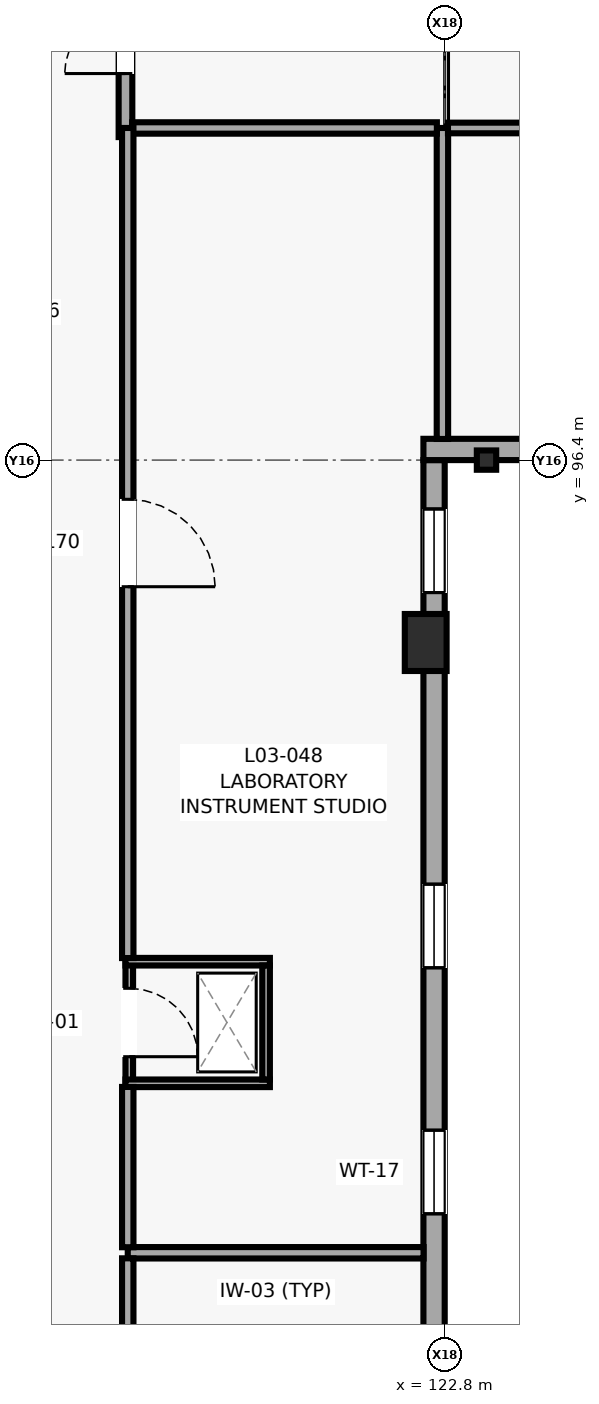
"""IFC4 building model, lengths in metres.
Left out: names, types, materials, properties, quantities, classifications, styles, units other than length and angle.
Written with IfcOpenShell. Run it as: python <this file> out.ifc"""

import sys

from ifc_helpers import new_model, si_unit, direction, frame, frame_2d, origin, origin_2d, place, context, subcontext, project, spatial, rectangle, i_section, extrude, element, fill, save


model = new_model("IFC4")
c1 = context("Model", 3, precision=1e-05, world=origin(), true_north=direction((0.0, 1.0)))
c2 = subcontext(c1, "Body", "Model", "MODEL_VIEW")
j1 = project(units=[si_unit("LENGTHUNIT", "METRE"), si_unit("PLANEANGLEUNIT", "RADIAN")], contexts=[c1])
p1 = place(None, origin())
s1 = spatial("IfcSite", under=j1, at=p1, CompositionType="ELEMENT")
p2 = place(p1, origin())
s2 = spatial("IfcBuilding", under=s1, at=p2, CompositionType="ELEMENT")
p3 = place(p2, frame((0.0, 0.0, 12.2)))
s3 = spatial("IfcBuildingStorey", under=s2, at=p3, CompositionType="ELEMENT", Elevation=12.2)
p4 = place(p3, frame((122.55, 94.0, 0.0), z_axis=(0.0, 0.0, 1.0), x_axis=(1.0, 0.0, 0.0)))
e1 = element("IfcColumn", 1, at=p4, inside=s3, PredefinedType="COLUMN", context=c2, shape_type="SweptSolid", body=[
    extrude(rectangle(XDim=0.55, YDim=0.75, at=origin_2d()), origin(), (0.0, 0.0, 1.0), 4.0),
])
p5 = place(p3, frame((123.35, 96.4, 0.0), z_axis=(0.0, 0.0, 1.0), x_axis=(1.0, 0.0, 0.0)))
e2 = element("IfcColumn", 2, at=p5, inside=s3, PredefinedType="COLUMN", context=c2, shape_type="SweptSolid", body=[
    extrude(i_section(OverallWidth=0.255, OverallDepth=0.254, WebThickness=0.009, FlangeThickness=0.014, FilletRadius=0.013, at=origin_2d()), origin(), (0.0, 0.0, 1.0), 4.0),
])
p6 = place(p3, frame((122.66, 84.14, 0.0), z_axis=(0.0, 0.0, 1.0), x_axis=(0.0, 1.0, 0.0)))
e3 = element("IfcWall", 3, at=p6, inside=s3, PredefinedType="SOLIDWALL", context=c2, shape_type="SweptSolid", body=[
    extrude(rectangle(XDim=12.26, YDim=0.28, at=frame_2d((6.13, 0.0))), origin(), (0.0, 0.0, 1.0), 3.165),
])
p7 = place(p6, frame((2.343, 0.0, 0.75)))
e4 = element("IfcOpeningElement", 4, at=p7, cuts=e3, PredefinedType="OPENING", context=c2, shape_type="SweptSolid", body=[
    extrude(rectangle(XDim=1.1, YDim=2.1, at=frame_2d((0.55, 1.05))), frame((0.0, 0.15, 0.0), z_axis=(0.0, -1.0, 0.0), x_axis=(1.0, 0.0, 0.0)), (0.0, 0.0, 1.0), 0.3),
])
p8 = place(p6, frame((5.58, 0.0, 0.75)))
e5 = element("IfcOpeningElement", 5, at=p8, cuts=e3, PredefinedType="OPENING", context=c2, shape_type="SweptSolid", body=[
    extrude(rectangle(XDim=1.1, YDim=2.1, at=frame_2d((0.55, 1.05))), frame((0.0, 0.15, 0.0), z_axis=(0.0, -1.0, 0.0), x_axis=(1.0, 0.0, 0.0)), (0.0, 0.0, 1.0), 0.3),
])
p9 = place(p6, frame((10.517, 0.0, 0.75)))
e6 = element("IfcOpeningElement", 6, at=p9, cuts=e3, PredefinedType="OPENING", context=c2, shape_type="SweptSolid", body=[
    extrude(rectangle(XDim=1.1, YDim=2.1, at=frame_2d((0.55, 1.05))), frame((0.0, 0.15, 0.0), z_axis=(0.0, -1.0, 0.0), x_axis=(1.0, 0.0, 0.0)), (0.0, 0.0, 1.0), 0.3),
])
p10 = place(p3, frame((122.52, 96.54, 0.0), z_axis=(0.0, 0.0, 1.0), x_axis=(1.0, 0.0, 0.0)))
e7 = element("IfcWall", 7, at=p10, inside=s3, PredefinedType="SOLIDWALL", context=c2, shape_type="SweptSolid", body=[
    extrude(rectangle(XDim=15.956, YDim=0.28, at=frame_2d((7.978, 0.0))), origin(), (0.0, 0.0, 1.0), 2.815),
])
p11 = place(p10, frame((1.57, 0.0, 0.65)))
e8 = element("IfcOpeningElement", 8, at=p11, cuts=e7, PredefinedType="OPENING", context=c2, shape_type="SweptSolid", body=[
    extrude(rectangle(XDim=1.75, YDim=2.05, at=frame_2d((0.875, 1.025))), frame((0.0, 0.15, 0.0), z_axis=(0.0, -1.0, 0.0), x_axis=(1.0, 0.0, 0.0)), (0.0, 0.0, 1.0), 0.3),
])
p12 = place(p10, frame((4.459, 0.0, 0.725)))
e9 = element("IfcOpeningElement", 9, at=p12, cuts=e7, PredefinedType="OPENING", context=c2, shape_type="SweptSolid", body=[
    extrude(rectangle(XDim=2.15, YDim=1.95, at=frame_2d((1.075, 0.975))), frame((0.0, 0.15, 0.0), z_axis=(0.0, -1.0, 0.0), x_axis=(1.0, 0.0, 0.0)), (0.0, 0.0, 1.0), 0.3),
])
p13 = place(p10, frame((9.073, 0.0, 0.85)))
e10 = element("IfcOpeningElement", 10, at=p13, cuts=e7, PredefinedType="OPENING", context=c2, shape_type="SweptSolid", body=[
    extrude(rectangle(XDim=1.8, YDim=1.8, at=frame_2d((0.9, 0.9))), frame((0.0, 0.15, 0.0), z_axis=(0.0, -1.0, 0.0), x_axis=(1.0, 0.0, 0.0)), (0.0, 0.0, 1.0), 0.3),
])
p14 = place(p10, frame((12.062, 0.0, 0.85)))
e11 = element("IfcOpeningElement", 11, at=p14, cuts=e7, PredefinedType="OPENING", context=c2, shape_type="SweptSolid", body=[
    extrude(rectangle(XDim=2.1, YDim=1.8, at=frame_2d((1.05, 0.9))), frame((0.0, 0.15, 0.0), z_axis=(0.0, -1.0, 0.0), x_axis=(1.0, 0.0, 0.0)), (0.0, 0.0, 1.0), 0.3),
])
p15 = place(p3, frame((118.6, 100.65, 0.0), z_axis=(0.0, 0.0, 1.0), x_axis=(0.0, 1.0, 0.0)))
e12 = element("IfcWall", 12, at=p15, inside=s3, PredefinedType="PARTITIONING", context=c2, shape_type="SweptSolid", body=[
    extrude(rectangle(XDim=3.272, YDim=0.18, at=frame_2d((1.636, 0.0))), origin(), (0.0, 0.0, 1.0), 3.78),
])
p16 = place(p15, frame((0.836, 0.0, 0.0)))
e13 = element("IfcOpeningElement", 13, at=p16, cuts=e12, PredefinedType="OPENING", context=c2, shape_type="SweptSolid", body=[
    extrude(rectangle(XDim=1.6, YDim=2.25, at=frame_2d((0.8, 1.125))), frame((0.0, 0.1, 0.0), z_axis=(0.0, -1.0, 0.0), x_axis=(1.0, 0.0, 0.0)), (0.0, 0.0, 1.0), 0.2),
])
p17 = place(p3, frame((118.65, 88.2, 0.0), z_axis=(0.0, 0.0, 1.0), x_axis=(0.0, 1.0, 0.0)))
e14 = element("IfcWall", 14, at=p17, inside=s3, PredefinedType="PARTITIONING", context=c2, shape_type="SweptSolid", body=[
    extrude(rectangle(XDim=1.6, YDim=0.1, at=frame_2d((0.8, 0.0))), origin(), (0.0, 0.0, 1.0), 3.165),
])
p18 = place(p17, frame((0.35, 0.0, 0.0)))
e15 = element("IfcOpeningElement", 15, at=p18, cuts=e14, PredefinedType="OPENING", context=c2, shape_type="SweptSolid", body=[
    extrude(rectangle(XDim=0.9, YDim=2.05, at=frame_2d((0.45, 1.025))), frame((0.0, 0.06, 0.0), z_axis=(0.0, -1.0, 0.0), x_axis=(1.0, 0.0, 0.0)), (0.0, 0.0, 1.0), 0.12),
])
for number, where, z_axis, x_axis in (
    (16, (118.6, 88.2, 0.0), (0.0, 0.0, 1.0), (1.0, 0.0, 0.0)),
    (17, (118.6, 89.8, 0.0), (0.0, 0.0, 1.0), (1.0, 0.0, 0.0)),
):
    element("IfcWall", number, at=place(p3, frame(where, z_axis=z_axis, x_axis=x_axis)), inside=s3, PredefinedType="PARTITIONING", context=c2, shape_type="SweptSolid", body=[
        extrude(rectangle(XDim=1.9, YDim=0.1, at=frame_2d((0.95, 0.0))), origin(), (0.0, 0.0, 1.0), 3.78),
    ])
p19 = place(p3, frame((120.45, 88.25, 0.0), z_axis=(0.0, 0.0, 1.0), x_axis=(0.0, 1.0, 0.0)))
e18 = element("IfcWall", 18, at=p19, inside=s3, PredefinedType="PARTITIONING", context=c2, shape_type="SweptSolid", body=[
    extrude(rectangle(XDim=1.5, YDim=0.1, at=frame_2d((0.75, 0.0))), origin(), (0.0, 0.0, 1.0), 3.78),
])
p20 = place(p3, frame((122.522, 85.97, 0.0), z_axis=(0.0, 0.0, 1.0), x_axis=(-1.0, 0.0, 0.0)))
e19 = element("IfcWall", 19, at=p20, inside=s3, PredefinedType="PARTITIONING", context=c2, shape_type="SweptSolid", body=[
    extrude(rectangle(XDim=3.892, YDim=0.15, at=frame_2d((1.946, 0.0))), origin(), (0.0, 0.0, 1.0), 3.715),
])
p21 = place(p3, frame((118.63, 85.897, 0.0), z_axis=(0.0, 0.0, 1.0), x_axis=(0.0, -1.0, 0.0)))
e20 = element("IfcWall", 20, at=p21, inside=s3, PredefinedType="PARTITIONING", context=c2, shape_type="SweptSolid", body=[
    extrude(rectangle(XDim=14.019, YDim=0.15, at=frame_2d((7.01, 0.0))), origin(), (0.0, 0.0, 1.0), 3.165),
])
p22 = place(p21, frame((6.535, 0.0, 0.0)))
e21 = element("IfcOpeningElement", 21, at=p22, cuts=e20, PredefinedType="OPENING", context=c2, shape_type="SweptSolid", body=[
    extrude(rectangle(XDim=0.95, YDim=2.1, at=frame_2d((0.475, 1.05))), frame((0.0, 0.085, 0.0), z_axis=(0.0, -1.0, 0.0), x_axis=(1.0, 0.0, 0.0)), (0.0, 0.0, 1.0), 0.17),
])
p23 = place(p3, frame((122.77, 96.678, 0.0), z_axis=(0.0, 0.0, 1.0), x_axis=(0.0, 1.0, 0.0)))
e22 = element("IfcWall", 22, at=p23, inside=s3, PredefinedType="PARTITIONING", context=c2, shape_type="SweptSolid", body=[
    extrude(rectangle(XDim=4.092, YDim=0.15, at=frame_2d((2.046, 0.0))), origin(), (0.0, 0.0, 1.0), 3.715),
])
p24 = place(p3, frame((122.697, 100.77, 0.0), z_axis=(0.0, 0.0, 1.0), x_axis=(-1.0, 0.0, 0.0)))
e23 = element("IfcWall", 23, at=p24, inside=s3, PredefinedType="PARTITIONING", context=c2, shape_type="SweptSolid", body=[
    extrude(rectangle(XDim=4.009, YDim=0.15, at=frame_2d((2.004, 0.0))), origin(), (0.0, 0.0, 1.0), 3.715),
])
p25 = place(p3, frame((118.63, 100.77, 0.0), z_axis=(0.0, 0.0, 1.0), x_axis=(0.0, -1.0, 0.0)))
e24 = element("IfcWall", 24, at=p25, inside=s3, PredefinedType="PARTITIONING", context=c2, shape_type="SweptSolid", body=[
    extrude(rectangle(XDim=10.922, YDim=0.15, at=frame_2d((5.461, 0.0))), origin(), (0.0, 0.0, 1.0), 3.165),
])
p26 = place(p25, frame((4.886, 0.0, 0.0)))
e25 = element("IfcOpeningElement", 25, at=p26, cuts=e24, PredefinedType="OPENING", context=c2, shape_type="SweptSolid", body=[
    extrude(rectangle(XDim=1.15, YDim=2.2, at=frame_2d((0.575, 1.1))), frame((0.0, 0.085, 0.0), z_axis=(0.0, -1.0, 0.0), x_axis=(1.0, 0.0, 0.0)), (0.0, 0.0, 1.0), 0.17),
])
p27 = place(p3, frame((118.63, 88.152, 0.0), z_axis=(0.0, 0.0, 1.0), x_axis=(0.0, -1.0, 0.0)))
e26 = element("IfcWall", 26, at=p27, inside=s3, PredefinedType="PARTITIONING", context=c2, shape_type="SweptSolid", body=[
    extrude(rectangle(XDim=2.109, YDim=0.15, at=frame_2d((1.055, 0.0))), origin(), (0.0, 0.0, 1.0), 3.165),
])
p28 = place(p3, frame((137.062, 100.77, 0.0), z_axis=(0.0, 0.0, 1.0), x_axis=(-1.0, 0.0, 0.0)))
e27 = element("IfcWall", 27, at=p28, inside=s3, PredefinedType="PARTITIONING", context=c2, shape_type="SweptSolid", body=[
    extrude(rectangle(XDim=14.219, YDim=0.14, at=frame_2d((7.109, 0.0))), origin(), (0.0, 0.0, 1.0), 3.715),
])
p29 = place(p28, frame((6.285, 0.0, 0.0)))
e28 = element("IfcOpeningElement", 28, at=p29, cuts=e27, PredefinedType="OPENING", context=c2, shape_type="SweptSolid", body=[
    extrude(rectangle(XDim=1.65, YDim=2.32, at=frame_2d((0.825, 1.16))), frame((0.0, 0.08, 0.0), z_axis=(0.0, -1.0, 0.0), x_axis=(1.0, 0.0, 0.0)), (0.0, 0.0, 1.0), 0.16),
])
p30 = place(p28, frame((8.635, 0.0, 1.05)))
e29 = element("IfcOpeningElement", 29, at=p30, cuts=e27, PredefinedType="OPENING", context=c2, shape_type="SweptSolid", body=[
    extrude(rectangle(XDim=1.8, YDim=1.2, at=frame_2d((0.9, 0.6))), frame((0.0, 0.08, 0.0), z_axis=(0.0, -1.0, 0.0), x_axis=(1.0, 0.0, 0.0)), (0.0, 0.0, 1.0), 0.16),
])
p31 = place(p7, origin())
e30 = element("IfcWindow", 30, at=p31, inside=s3, PartitioningType="SINGLE_PANEL", PredefinedType="WINDOW", context=c2, shape_type="SweptSolid", body=[
    extrude(rectangle(XDim=1.1, YDim=2.1, at=frame_2d((0.55, 1.05))), frame((0.0, 0.03, 0.0), z_axis=(0.0, -1.0, 0.0), x_axis=(1.0, 0.0, 0.0)), (0.0, 0.0, 1.0), 0.06),
])
fill(e4, e30)
p32 = place(p8, origin())
e31 = element("IfcWindow", 31, at=p32, inside=s3, PartitioningType="SINGLE_PANEL", PredefinedType="WINDOW", context=c2, shape_type="SweptSolid", body=[
    extrude(rectangle(XDim=1.1, YDim=2.1, at=frame_2d((0.55, 1.05))), frame((0.0, 0.03, 0.0), z_axis=(0.0, -1.0, 0.0), x_axis=(1.0, 0.0, 0.0)), (0.0, 0.0, 1.0), 0.06),
])
fill(e5, e31)
p33 = place(p9, origin())
e32 = element("IfcWindow", 32, at=p33, inside=s3, PartitioningType="SINGLE_PANEL", PredefinedType="WINDOW", context=c2, shape_type="SweptSolid", body=[
    extrude(rectangle(XDim=1.1, YDim=2.1, at=frame_2d((0.55, 1.05))), frame((0.0, 0.03, 0.0), z_axis=(0.0, -1.0, 0.0), x_axis=(1.0, 0.0, 0.0)), (0.0, 0.0, 1.0), 0.06),
])
fill(e6, e32)
p34 = place(p16, origin())
e33 = element("IfcDoor", 33, at=p34, inside=s3, OperationType="DOUBLE_DOOR_SINGLE_SWING", PredefinedType="DOOR", context=c2, shape_type="SweptSolid", body=[
    extrude(rectangle(XDim=1.6, YDim=2.25, at=frame_2d((0.8, 1.125))), frame((0.0, 0.025, 0.0), z_axis=(0.0, -1.0, 0.0), x_axis=(1.0, 0.0, 0.0)), (0.0, 0.0, 1.0), 0.05),
])
fill(e13, e33)
p35 = place(p18, frame((0.9, 0.0, 0.0), z_axis=(0.0, 0.0, 1.0), x_axis=(-1.0, 0.0, 0.0)))
e34 = element("IfcDoor", 34, at=p35, inside=s3, OperationType="SINGLE_SWING_LEFT", PredefinedType="USERDEFINED", context=c2, shape_type="SweptSolid", body=[
    extrude(rectangle(XDim=0.9, YDim=2.05, at=frame_2d((0.45, 1.025))), frame((0.0, 0.025, 0.0), z_axis=(0.0, -1.0, 0.0), x_axis=(1.0, 0.0, 0.0)), (0.0, 0.0, 1.0), 0.05),
])
fill(e15, e34)
p36 = place(p26, origin())
e35 = element("IfcDoor", 35, at=p36, inside=s3, OperationType="SINGLE_SWING_RIGHT", PredefinedType="DOOR", context=c2, shape_type="SweptSolid", body=[
    extrude(rectangle(XDim=1.15, YDim=2.2, at=frame_2d((0.575, 1.1))), frame((0.0, 0.025, 0.0), z_axis=(0.0, -1.0, 0.0), x_axis=(1.0, 0.0, 0.0)), (0.0, 0.0, 1.0), 0.05),
])
fill(e25, e35)
save(model, sys.argv[1])
